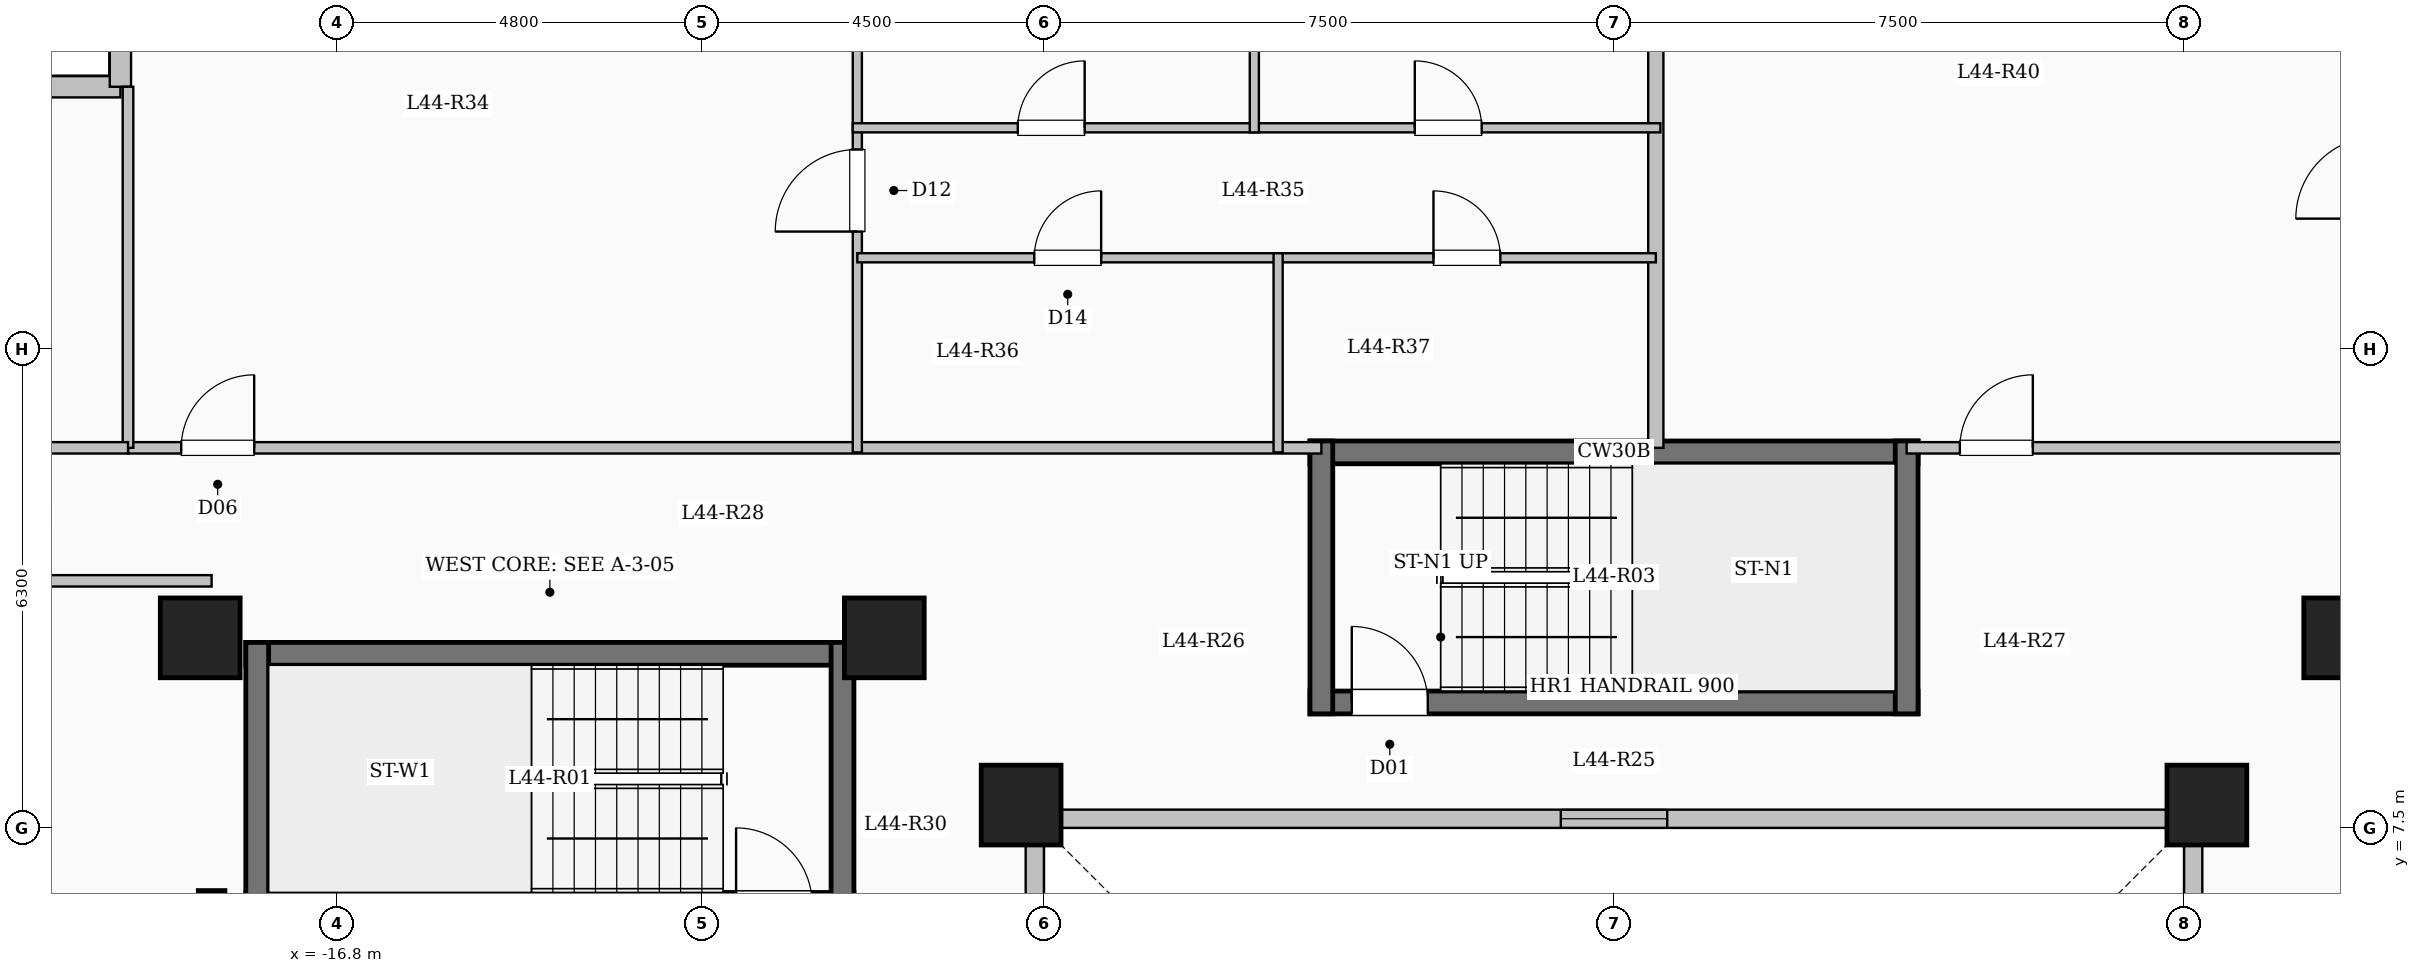
"""IFC4 building model, lengths in metres.
Left out: names, types, materials, properties, quantities, classifications, styles, units other than length and angle.
Written with IfcOpenShell. Run it as: python <this file> out.ifc"""

import sys

from ifc_helpers import new_model, si_unit, direction, frame, frame_2d, origin, origin_2d, place, context, subcontext, project, spatial, rectangle, extrude, element, fill, save


model = new_model("IFC4")
c1 = context("Model", 3, precision=1e-05, world=origin(), true_north=direction((0.0, 1.0)))
c2 = subcontext(c1, "Body", "Model", "MODEL_VIEW")
j1 = project(units=[si_unit("LENGTHUNIT", "METRE"), si_unit("PLANEANGLEUNIT", "RADIAN")], contexts=[c1])
p1 = place(None, origin())
s1 = spatial("IfcSite", under=j1, at=p1, CompositionType="ELEMENT")
p2 = place(p1, origin())
s2 = spatial("IfcBuilding", under=s1, at=p2, CompositionType="ELEMENT")
p3 = place(p2, frame((0.0, 0.0, 162.75)))
s3 = spatial("IfcBuildingStorey", under=s2, at=p3, CompositionType="ELEMENT", Elevation=162.75)
for number, where, z_axis, x_axis in (
    (1, (-7.8, 7.8, 0.0), (0.0, 0.0, 1.0), (1.0, 0.0, 0.0)),
    (2, (7.8, 7.8, 0.0), (0.0, 0.0, 1.0), (1.0, 0.0, 0.0)),
    (3, (-9.6, 10.0, 0.0), (0.0, 0.0, 1.0), (1.0, 0.0, 0.0)),
    (4, (9.6, 10.0, 0.0), (0.0, 0.0, 1.0), (1.0, 0.0, 0.0)),
    (5, (-18.6, 10.0, 0.0), (0.0, 0.0, 1.0), (1.0, 0.0, 0.0)),
):
    element("IfcColumn", number, at=place(p3, frame(where, z_axis=z_axis, x_axis=x_axis)), inside=s3, PredefinedType="COLUMN", context=c2, shape_type="SweptSolid", body=[
        extrude(rectangle(XDim=1.05, YDim=1.05, at=origin_2d()), origin(), (0.0, 0.0, 1.0), 3.35),
    ])
p4 = place(p3, frame((7.62, -7.62, 0.0), z_axis=(0.0, 0.0, 1.0), x_axis=(0.0, 1.0, 0.0)))
e6 = element("IfcWall", 6, at=p4, inside=s3, PredefinedType="SOLIDWALL", context=c2, shape_type="SweptSolid", body=[
    extrude(rectangle(XDim=15.24, YDim=0.24, at=frame_2d((7.62, 0.0))), origin(), (0.0, 0.0, 1.0), 3.1),
])
p5 = place(p4, frame((6.92, 0.0, 0.95)))
e7 = element("IfcOpeningElement", 7, at=p5, cuts=e6, PredefinedType="OPENING", context=c2, shape_type="SweptSolid", body=[
    extrude(rectangle(XDim=1.4, YDim=1.5, at=frame_2d((0.7, 0.75))), frame((0.0, 0.13, 0.0), z_axis=(0.0, -1.0, 0.0), x_axis=(1.0, 0.0, 0.0)), (0.0, 0.0, 1.0), 0.26),
])
p6 = place(p3, frame((7.62, 7.62, 0.0), z_axis=(0.0, 0.0, 1.0), x_axis=(-1.0, 0.0, 0.0)))
e8 = element("IfcWall", 8, at=p6, inside=s3, PredefinedType="SOLIDWALL", context=c2, shape_type="SweptSolid", body=[
    extrude(rectangle(XDim=15.24, YDim=0.24, at=frame_2d((7.62, 0.0))), origin(), (0.0, 0.0, 1.0), 3.1),
])
p7 = place(p6, frame((6.92, 0.0, 0.95)))
e9 = element("IfcOpeningElement", 9, at=p7, cuts=e8, PredefinedType="OPENING", context=c2, shape_type="SweptSolid", body=[
    extrude(rectangle(XDim=1.4, YDim=1.5, at=frame_2d((0.7, 0.75))), frame((0.0, 0.13, 0.0), z_axis=(0.0, -1.0, 0.0), x_axis=(1.0, 0.0, 0.0)), (0.0, 0.0, 1.0), 0.26),
])
p8 = place(p3, frame((-7.62, 7.62, 0.0), z_axis=(0.0, 0.0, 1.0), x_axis=(0.0, -1.0, 0.0)))
e10 = element("IfcWall", 10, at=p8, inside=s3, PredefinedType="SOLIDWALL", context=c2, shape_type="SweptSolid", body=[
    extrude(rectangle(XDim=15.24, YDim=0.24, at=frame_2d((7.62, 0.0))), origin(), (0.0, 0.0, 1.0), 3.1),
])
p9 = place(p8, frame((6.92, 0.0, 0.95)))
e11 = element("IfcOpeningElement", 11, at=p9, cuts=e10, PredefinedType="OPENING", context=c2, shape_type="SweptSolid", body=[
    extrude(rectangle(XDim=1.4, YDim=1.5, at=frame_2d((0.7, 0.75))), frame((0.0, 0.13, 0.0), z_axis=(0.0, -1.0, 0.0), x_axis=(1.0, 0.0, 0.0)), (0.0, 0.0, 1.0), 0.26),
])
p10 = place(p3, frame((-25.05, 17.25, 0.0), z_axis=(0.0, 0.0, 1.0), x_axis=(1.0, 0.0, 0.0)))
e12 = element("IfcWall", 12, at=p10, inside=s3, PredefinedType="SOLIDWALL", context=c2, shape_type="SweptSolid", body=[
    extrude(rectangle(XDim=5.4, YDim=0.28, at=frame_2d((2.7, 0.0))), origin(), (0.0, 0.0, 1.0), 3.1),
])
p11 = place(p10, frame((1.725, 0.0, 0.9)))
e13 = element("IfcOpeningElement", 13, at=p11, cuts=e12, PredefinedType="OPENING", context=c2, shape_type="SweptSolid", body=[
    extrude(rectangle(XDim=2.0, YDim=1.7, at=frame_2d((1.0, 0.85))), frame((0.0, 0.15, 0.0), z_axis=(0.0, -1.0, 0.0), x_axis=(1.0, 0.0, 0.0)), (0.0, 0.0, 1.0), 0.3),
])
p12 = place(p3, frame((-19.65, 17.25, 0.0), z_axis=(0.0, 0.0, 1.0), x_axis=(0.0, 1.0, 0.0)))
e14 = element("IfcWall", 14, at=p12, inside=s3, PredefinedType="SOLIDWALL", context=c2, shape_type="SweptSolid", body=[
    extrude(rectangle(XDim=3.9, YDim=0.28, at=frame_2d((1.95, 0.0))), origin(), (0.0, 0.0, 1.0), 3.1),
])
p13 = place(p12, frame((1.107, 0.0, 0.9)))
e15 = element("IfcOpeningElement", 15, at=p13, cuts=e14, PredefinedType="OPENING", context=c2, shape_type="SweptSolid", body=[
    extrude(rectangle(XDim=1.65, YDim=1.6, at=frame_2d((0.825, 0.8))), frame((0.0, 0.15, 0.0), z_axis=(0.0, -1.0, 0.0), x_axis=(1.0, 0.0, 0.0)), (0.0, 0.0, 1.0), 0.3),
])
p14 = place(p3, frame((-18.0, 9.79, 0.0), z_axis=(0.0, 0.0, 1.0), x_axis=(1.0, 0.0, 0.0)))
e16 = element("IfcWall", 16, at=p14, inside=s3, PredefinedType="SHEAR", context=c2, shape_type="SweptSolid", body=[
    extrude(rectangle(XDim=8.0, YDim=0.3, at=frame_2d((4.0, 0.0))), origin(), (0.0, 0.0, 1.0), 3.35),
])
p15 = place(p3, frame((-18.0, 6.5, 0.0), z_axis=(0.0, 0.0, 1.0), x_axis=(1.0, 0.0, 0.0)))
e17 = element("IfcWall", 17, at=p15, inside=s3, PredefinedType="SHEAR", context=c2, shape_type="SweptSolid", body=[
    extrude(rectangle(XDim=8.0, YDim=0.3, at=frame_2d((4.0, 0.0))), origin(), (0.0, 0.0, 1.0), 3.35),
])
p16 = place(p15, frame((6.45, 0.0, 0.0)))
e18 = element("IfcOpeningElement", 18, at=p16, cuts=e17, PredefinedType="OPENING", context=c2, shape_type="SweptSolid", body=[
    extrude(rectangle(XDim=1.0, YDim=2.15, at=frame_2d((0.5, 1.075))), frame((0.0, 0.16, 0.0), z_axis=(0.0, -1.0, 0.0), x_axis=(1.0, 0.0, 0.0)), (0.0, 0.0, 1.0), 0.32),
])
for number, where, z_axis, x_axis in (
    (19, (-17.85, 6.35, 0.0), (0.0, 0.0, 1.0), (0.0, 1.0, 0.0)),
    (20, (-10.15, 6.35, 0.0), (0.0, 0.0, 1.0), (0.0, 1.0, 0.0)),
):
    element("IfcWall", number, at=place(p3, frame(where, z_axis=z_axis, x_axis=x_axis)), inside=s3, PredefinedType="SHEAR", context=c2, shape_type="SweptSolid", body=[
        extrude(rectangle(XDim=3.59, YDim=0.3, at=frame_2d((1.795, 0.0))), origin(), (0.0, 0.0, 1.0), 3.35),
    ])
p17 = place(p3, frame((-4.0, 12.44, 0.0), z_axis=(0.0, 0.0, 1.0), x_axis=(1.0, 0.0, 0.0)))
e21 = element("IfcWall", 21, at=p17, inside=s3, PredefinedType="SHEAR", context=c2, shape_type="SweptSolid", body=[
    extrude(rectangle(XDim=8.0, YDim=0.3, at=frame_2d((4.0, 0.0))), origin(), (0.0, 0.0, 1.0), 3.35),
])
p18 = place(p3, frame((-4.0, 9.15, 0.0), z_axis=(0.0, 0.0, 1.0), x_axis=(1.0, 0.0, 0.0)))
e22 = element("IfcWall", 22, at=p18, inside=s3, PredefinedType="SHEAR", context=c2, shape_type="SweptSolid", body=[
    extrude(rectangle(XDim=8.0, YDim=0.3, at=frame_2d((4.0, 0.0))), origin(), (0.0, 0.0, 1.0), 3.35),
])
p19 = place(p18, frame((0.55, 0.0, 0.0)))
e23 = element("IfcOpeningElement", 23, at=p19, cuts=e22, PredefinedType="OPENING", context=c2, shape_type="SweptSolid", body=[
    extrude(rectangle(XDim=1.0, YDim=2.15, at=frame_2d((0.5, 1.075))), frame((0.0, 0.16, 0.0), z_axis=(0.0, -1.0, 0.0), x_axis=(1.0, 0.0, 0.0)), (0.0, 0.0, 1.0), 0.32),
])
for number, where, z_axis, x_axis in (
    (24, (-3.85, 9.0, 0.0), (0.0, 0.0, 1.0), (0.0, 1.0, 0.0)),
    (25, (3.85, 9.0, 0.0), (0.0, 0.0, 1.0), (0.0, 1.0, 0.0)),
):
    element("IfcWall", number, at=place(p3, frame(where, z_axis=z_axis, x_axis=x_axis)), inside=s3, PredefinedType="SHEAR", context=c2, shape_type="SweptSolid", body=[
        extrude(rectangle(XDim=3.59, YDim=0.3, at=frame_2d((1.795, 0.0))), origin(), (0.0, 0.0, 1.0), 3.35),
    ])
p20 = place(p3, frame((-18.45, -7.375, 0.0), z_axis=(0.0, 0.0, 1.0), x_axis=(0.0, 1.0, 0.0)))
e26 = element("IfcWall", 26, at=p20, inside=s3, PredefinedType="SHEAR", context=c2, shape_type="SweptSolid", body=[
    extrude(rectangle(XDim=14.05, YDim=0.35, at=frame_2d((7.025, 0.0))), origin(), (0.0, 0.0, 1.0), 3.35),
])
p21 = place(p3, frame((-19.55, 12.5, 0.0), z_axis=(0.0, 0.0, 1.0), x_axis=(1.0, 0.0, 0.0)))
e27 = element("IfcWall", 27, at=p21, inside=s3, PredefinedType="PARTITIONING", context=c2, shape_type="SweptSolid", body=[
    extrude(rectangle(XDim=15.7, YDim=0.15, at=frame_2d((7.85, 0.0))), origin(), (0.0, 0.0, 1.0), 3.1),
])
p22 = place(p21, frame((0.7, 0.0, 0.0)))
e28 = element("IfcOpeningElement", 28, at=p22, cuts=e27, PredefinedType="OPENING", context=c2, shape_type="SweptSolid", body=[
    extrude(rectangle(XDim=0.96, YDim=2.15, at=frame_2d((0.48, 1.075))), frame((0.0, 0.085, 0.0), z_axis=(0.0, -1.0, 0.0), x_axis=(1.0, 0.0, 0.0)), (0.0, 0.0, 1.0), 0.17),
])
p23 = place(p3, frame((3.85, 12.5, 0.0), z_axis=(0.0, 0.0, 1.0), x_axis=(1.0, 0.0, 0.0)))
e29 = element("IfcWall", 29, at=p23, inside=s3, PredefinedType="PARTITIONING", context=c2, shape_type="SweptSolid", body=[
    extrude(rectangle(XDim=15.7, YDim=0.15, at=frame_2d((7.85, 0.0))), origin(), (0.0, 0.0, 1.0), 3.1),
])
p24 = place(p23, frame((0.7, 0.0, 0.0)))
e30 = element("IfcOpeningElement", 30, at=p24, cuts=e29, PredefinedType="OPENING", context=c2, shape_type="SweptSolid", body=[
    extrude(rectangle(XDim=0.96, YDim=2.15, at=frame_2d((0.48, 1.075))), frame((0.0, 0.085, 0.0), z_axis=(0.0, -1.0, 0.0), x_axis=(1.0, 0.0, 0.0)), (0.0, 0.0, 1.0), 0.17),
])
p25 = place(p3, frame((0.55, 12.5, 0.0), z_axis=(0.0, 0.0, 1.0), x_axis=(0.0, 1.0, 0.0)))
e31 = element("IfcWall", 31, at=p25, inside=s3, PredefinedType="SOLIDWALL", context=c2, shape_type="SweptSolid", body=[
    extrude(rectangle(XDim=10.18, YDim=0.2, at=frame_2d((5.09, 0.0))), origin(), (0.0, 0.0, 1.0), 3.1),
])
p26 = place(p3, frame((-9.955, 12.44, 0.0), z_axis=(0.0, 0.0, 1.0), x_axis=(0.0, 1.0, 0.0)))
e32 = element("IfcWall", 32, at=p26, inside=s3, PredefinedType="PARTITIONING", context=c2, shape_type="SweptSolid", body=[
    extrude(rectangle(XDim=9.018, YDim=0.12, at=frame_2d((4.509, 0.0))), origin(), (0.0, 0.0, 1.0), 3.1),
])
p27 = place(p26, frame((2.905, 0.0, 0.0)))
e33 = element("IfcOpeningElement", 33, at=p27, cuts=e32, PredefinedType="OPENING", context=c2, shape_type="SweptSolid", body=[
    extrude(rectangle(XDim=1.08, YDim=2.15, at=frame_2d((0.54, 1.075))), frame((0.0, 0.07, 0.0), z_axis=(0.0, -1.0, 0.0), x_axis=(1.0, 0.0, 0.0)), (0.0, 0.0, 1.0), 0.14),
])
p28 = place(p3, frame((-9.955, 15.0, 0.0), z_axis=(0.0, 0.0, 1.0), x_axis=(1.0, 0.0, 0.0)))
e34 = element("IfcWall", 34, at=p28, inside=s3, PredefinedType="PARTITIONING", context=c2, shape_type="SweptSolid", body=[
    extrude(rectangle(XDim=5.536, YDim=0.12, at=frame_2d((2.768, 0.0))), origin(), (0.0, 0.0, 1.0), 3.1),
])
p29 = place(p28, frame((2.328, 0.0, 0.0)))
e35 = element("IfcOpeningElement", 35, at=p29, cuts=e34, PredefinedType="OPENING", context=c2, shape_type="SweptSolid", body=[
    extrude(rectangle(XDim=0.88, YDim=2.1, at=frame_2d((0.44, 1.05))), frame((0.0, 0.07, 0.0), z_axis=(0.0, -1.0, 0.0), x_axis=(1.0, 0.0, 0.0)), (0.0, 0.0, 1.0), 0.14),
])
p30 = place(p3, frame((-4.419, 15.0, 0.0), z_axis=(0.0, 0.0, 1.0), x_axis=(1.0, 0.0, 0.0)))
e36 = element("IfcWall", 36, at=p30, inside=s3, PredefinedType="PARTITIONING", context=c2, shape_type="SweptSolid", body=[
    extrude(rectangle(XDim=4.969, YDim=0.12, at=frame_2d((2.484, 0.0))), origin(), (0.0, 0.0, 1.0), 3.1),
])
p31 = place(p30, frame((2.044, 0.0, 0.0)))
e37 = element("IfcOpeningElement", 37, at=p31, cuts=e36, PredefinedType="OPENING", context=c2, shape_type="SweptSolid", body=[
    extrude(rectangle(XDim=0.88, YDim=2.1, at=frame_2d((0.44, 1.05))), frame((0.0, 0.07, 0.0), z_axis=(0.0, -1.0, 0.0), x_axis=(1.0, 0.0, 0.0)), (0.0, 0.0, 1.0), 0.14),
])
p32 = place(p3, frame((-10.015, 16.71, 0.0), z_axis=(0.0, 0.0, 1.0), x_axis=(1.0, 0.0, 0.0)))
e38 = element("IfcWall", 38, at=p32, inside=s3, PredefinedType="PARTITIONING", context=c2, shape_type="SweptSolid", body=[
    extrude(rectangle(XDim=10.625, YDim=0.12, at=frame_2d((5.312, 0.0))), origin(), (0.0, 0.0, 1.0), 3.1),
])
p33 = place(p32, frame((2.171, 0.0, 0.0)))
e39 = element("IfcOpeningElement", 39, at=p33, cuts=e38, PredefinedType="OPENING", context=c2, shape_type="SweptSolid", body=[
    extrude(rectangle(XDim=0.88, YDim=2.1, at=frame_2d((0.44, 1.05))), frame((0.0, 0.07, 0.0), z_axis=(0.0, -1.0, 0.0), x_axis=(1.0, 0.0, 0.0)), (0.0, 0.0, 1.0), 0.14),
])
p34 = place(p32, frame((7.394, 0.0, 0.0)))
e40 = element("IfcOpeningElement", 40, at=p34, cuts=e38, PredefinedType="OPENING", context=c2, shape_type="SweptSolid", body=[
    extrude(rectangle(XDim=0.88, YDim=2.1, at=frame_2d((0.44, 1.05))), frame((0.0, 0.07, 0.0), z_axis=(0.0, -1.0, 0.0), x_axis=(1.0, 0.0, 0.0)), (0.0, 0.0, 1.0), 0.14),
])
p35 = place(p3, frame((-4.419, 12.44, 0.0), z_axis=(0.0, 0.0, 1.0), x_axis=(0.0, 1.0, 0.0)))
e41 = element("IfcWall", 41, at=p35, inside=s3, PredefinedType="PARTITIONING", context=c2, shape_type="SweptSolid", body=[
    extrude(rectangle(XDim=2.62, YDim=0.12, at=frame_2d((1.31, 0.0))), origin(), (0.0, 0.0, 1.0), 3.1),
])
p36 = place(p3, frame((-4.732, 16.65, 0.0), z_axis=(0.0, 0.0, 1.0), x_axis=(0.0, 1.0, 0.0)))
e42 = element("IfcWall", 42, at=p36, inside=s3, PredefinedType="PARTITIONING", context=c2, shape_type="SweptSolid", body=[
    extrude(rectangle(XDim=6.03, YDim=0.12, at=frame_2d((3.015, 0.0))), origin(), (0.0, 0.0, 1.0), 3.1),
])
p37 = place(p3, frame((-25.08, 10.75, 0.0), z_axis=(0.0, 0.0, 1.0), x_axis=(1.0, 0.0, 0.0)))
e43 = element("IfcWall", 43, at=p37, inside=s3, PredefinedType="PARTITIONING", context=c2, shape_type="SweptSolid", body=[
    extrude(rectangle(XDim=6.63, YDim=0.15, at=frame_2d((3.315, 0.0))), origin(), (0.0, 0.0, 1.0), 3.1),
])
p38 = place(p3, frame((-19.55, 12.5, 0.0), z_axis=(0.0, 0.0, 1.0), x_axis=(0.0, 1.0, 0.0)))
e44 = element("IfcWall", 44, at=p38, inside=s3, PredefinedType="PARTITIONING", context=c2, shape_type="SweptSolid", body=[
    extrude(rectangle(XDim=4.75, YDim=0.14, at=frame_2d((2.375, 0.0))), origin(), (0.0, 0.0, 1.0), 3.1),
])
p39 = place(p3, frame((-25.08, 12.5, 0.0), z_axis=(0.0, 0.0, 1.0), x_axis=(1.0, 0.0, 0.0)))
e45 = element("IfcWall", 45, at=p39, inside=s3, PredefinedType="PARTITIONING", context=c2, shape_type="SweptSolid", body=[
    extrude(rectangle(XDim=5.53, YDim=0.15, at=frame_2d((2.765, 0.0))), origin(), (0.0, 0.0, 1.0), 3.1),
])
p40 = place(p39, frame((2.29, 0.0, 0.0)))
e46 = element("IfcOpeningElement", 46, at=p40, cuts=e45, PredefinedType="OPENING", context=c2, shape_type="SweptSolid", body=[
    extrude(rectangle(XDim=0.95, YDim=2.15, at=frame_2d((0.475, 1.075))), frame((0.0, 0.085, 0.0), z_axis=(0.0, -1.0, 0.0), x_axis=(1.0, 0.0, 0.0)), (0.0, 0.0, 1.0), 0.17),
])
p41 = place(p7, origin())
e47 = element("IfcWindow", 47, at=p41, inside=s3, PartitioningType="SINGLE_PANEL", PredefinedType="WINDOW", context=c2, shape_type="SweptSolid", body=[
    extrude(rectangle(XDim=1.4, YDim=1.5, at=frame_2d((0.7, 0.75))), frame((0.0, 0.03, 0.0), z_axis=(0.0, -1.0, 0.0), x_axis=(1.0, 0.0, 0.0)), (0.0, 0.0, 1.0), 0.06),
])
fill(e9, e47)
p42 = place(p19, origin())
e48 = element("IfcDoor", 48, at=p42, inside=s3, OperationType="SINGLE_SWING_LEFT", PredefinedType="DOOR", context=c2, shape_type="SweptSolid", body=[
    extrude(rectangle(XDim=1.0, YDim=2.15, at=frame_2d((0.5, 1.075))), frame((0.0, 0.025, 0.0), z_axis=(0.0, -1.0, 0.0), x_axis=(1.0, 0.0, 0.0)), (0.0, 0.0, 1.0), 0.05),
])
fill(e23, e48)
p43 = place(p22, origin())
e49 = element("IfcDoor", 49, at=p43, inside=s3, OperationType="SINGLE_SWING_RIGHT", PredefinedType="DOOR", context=c2, shape_type="SweptSolid", body=[
    extrude(rectangle(XDim=0.96, YDim=2.15, at=frame_2d((0.48, 1.075))), frame((0.0, 0.025, 0.0), z_axis=(0.0, -1.0, 0.0), x_axis=(1.0, 0.0, 0.0)), (0.0, 0.0, 1.0), 0.05),
])
fill(e28, e49)
p44 = place(p27, origin())
e50 = element("IfcDoor", 50, at=p44, inside=s3, OperationType="SINGLE_SWING_LEFT", PredefinedType="DOOR", context=c2, shape_type="SweptSolid", body=[
    extrude(rectangle(XDim=1.08, YDim=2.15, at=frame_2d((0.54, 1.075))), frame((0.0, 0.025, 0.0), z_axis=(0.0, -1.0, 0.0), x_axis=(1.0, 0.0, 0.0)), (0.0, 0.0, 1.0), 0.05),
])
fill(e33, e50)
p45 = place(p29, origin())
e51 = element("IfcDoor", 51, at=p45, inside=s3, OperationType="SINGLE_SWING_RIGHT", PredefinedType="DOOR", context=c2, shape_type="SweptSolid", body=[
    extrude(rectangle(XDim=0.88, YDim=2.1, at=frame_2d((0.44, 1.05))), frame((0.0, 0.025, 0.0), z_axis=(0.0, -1.0, 0.0), x_axis=(1.0, 0.0, 0.0)), (0.0, 0.0, 1.0), 0.05),
])
fill(e35, e51)
p46 = place(p31, origin())
e52 = element("IfcDoor", 52, at=p46, inside=s3, OperationType="SINGLE_SWING_LEFT", PredefinedType="DOOR", context=c2, shape_type="SweptSolid", body=[
    extrude(rectangle(XDim=0.88, YDim=2.1, at=frame_2d((0.44, 1.05))), frame((0.0, 0.025, 0.0), z_axis=(0.0, -1.0, 0.0), x_axis=(1.0, 0.0, 0.0)), (0.0, 0.0, 1.0), 0.05),
])
fill(e37, e52)
p47 = place(p33, origin())
e53 = element("IfcDoor", 53, at=p47, inside=s3, OperationType="SINGLE_SWING_RIGHT", PredefinedType="DOOR", context=c2, shape_type="SweptSolid", body=[
    extrude(rectangle(XDim=0.88, YDim=2.1, at=frame_2d((0.44, 1.05))), frame((0.0, 0.025, 0.0), z_axis=(0.0, -1.0, 0.0), x_axis=(1.0, 0.0, 0.0)), (0.0, 0.0, 1.0), 0.05),
])
fill(e39, e53)
p48 = place(p34, origin())
e54 = element("IfcDoor", 54, at=p48, inside=s3, OperationType="SINGLE_SWING_LEFT", PredefinedType="DOOR", context=c2, shape_type="SweptSolid", body=[
    extrude(rectangle(XDim=0.88, YDim=2.1, at=frame_2d((0.44, 1.05))), frame((0.0, 0.025, 0.0), z_axis=(0.0, -1.0, 0.0), x_axis=(1.0, 0.0, 0.0)), (0.0, 0.0, 1.0), 0.05),
])
fill(e40, e54)
p49 = place(p24, origin())
e55 = element("IfcDoor", 55, at=p49, inside=s3, OperationType="SINGLE_SWING_RIGHT", PredefinedType="DOOR", context=c2, shape_type="SweptSolid", body=[
    extrude(rectangle(XDim=0.96, YDim=2.15, at=frame_2d((0.48, 1.075))), frame((0.0, 0.025, 0.0), z_axis=(0.0, -1.0, 0.0), x_axis=(1.0, 0.0, 0.0)), (0.0, 0.0, 1.0), 0.05),
])
fill(e30, e55)
save(model, sys.argv[1])
